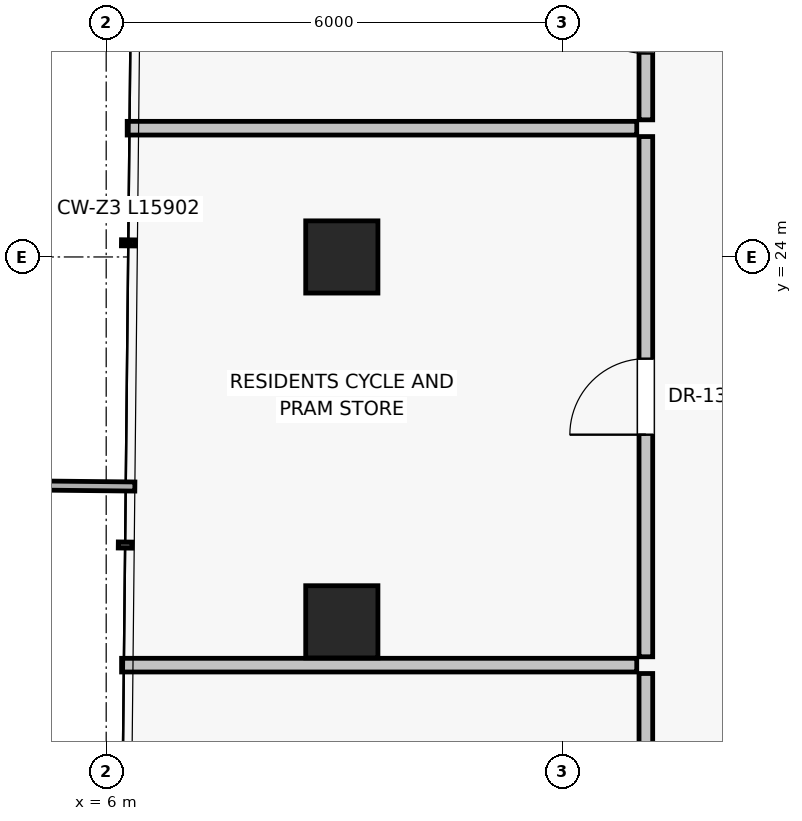
"""IFC4 building model, lengths in metres.
Left out: names, types, materials, properties, quantities, classifications, styles, units other than length and angle.
Written with IfcOpenShell. Run it as: python <this file> out.ifc"""

import sys

from ifc_helpers import new_model, si_unit, direction, frame, frame_2d, origin, origin_2d, place, context, subcontext, project, spatial, rectangle, extrude, source, transform, mapped, element, fill, save


model = new_model("IFC4")
c1 = context("Model", 3, precision=1e-05, world=origin(), true_north=direction((0.0, 1.0)))
c2 = subcontext(c1, "Body", "Model", "MODEL_VIEW")
j1 = project(units=[si_unit("LENGTHUNIT", "METRE"), si_unit("PLANEANGLEUNIT", "RADIAN")], contexts=[c1])
p1 = place(None, origin())
s1 = spatial("IfcSite", under=j1, at=p1, CompositionType="ELEMENT")
p2 = place(p1, origin())
s2 = spatial("IfcBuilding", under=s1, at=p2, CompositionType="ELEMENT")
p3 = place(p2, frame((0.0, 0.0, 208.1)))
s3 = spatial("IfcBuildingStorey", under=s2, at=p3, CompositionType="ELEMENT", Elevation=208.1)
for number, where, z_axis, x_axis in (
    (1, (9.1, 24.0, 0.0), (0.0, 0.0, 1.0), (1.0, 0.0, 0.0)),
    (2, (9.1, 19.2, 0.0), (0.0, 0.0, 1.0), (1.0, 0.0, 0.0)),
):
    element("IfcColumn", number, at=place(p3, frame(where, z_axis=z_axis, x_axis=x_axis)), inside=s3, PredefinedType="COLUMN", context=c2, shape_type="SweptSolid", body=[
        extrude(rectangle(XDim=0.95, YDim=0.95, at=origin_2d()), origin(), (0.0, 0.0, 1.0), 3.25),
    ])
p4 = place(p3, frame((13.1, 14.41, 0.0), z_axis=(0.0, 0.0, 1.0), x_axis=(0.0, 1.0, 0.0)))
e3 = element("IfcWall", 3, at=p4, inside=s3, PredefinedType="PARTITIONING", context=c2, shape_type="SweptSolid", body=[
    extrude(rectangle(XDim=4.11, YDim=0.18, at=frame_2d((2.055, 0.0))), origin(), (0.0, 0.0, 1.0), 2.617),
])
p5 = place(p4, frame((1.555, 0.0, 0.0)))
e4 = element("IfcOpeningElement", 4, at=p5, cuts=e3, PredefinedType="OPENING", context=c2, shape_type="SweptSolid", body=[
    extrude(rectangle(XDim=1.0, YDim=2.01, at=frame_2d((0.5, 1.005))), frame((0.0, 0.1, 0.0), z_axis=(0.0, -1.0, 0.0), x_axis=(1.0, 0.0, 0.0)), (0.0, 0.0, 1.0), 0.2),
])
p6 = place(p3, frame((13.1, 18.74, 0.0), z_axis=(0.0, 0.0, 1.0), x_axis=(0.0, 1.0, 0.0)))
e5 = element("IfcWall", 5, at=p6, inside=s3, PredefinedType="PARTITIONING", context=c2, shape_type="SweptSolid", body=[
    extrude(rectangle(XDim=6.844, YDim=0.18, at=frame_2d((3.422, 0.0))), origin(), (0.0, 0.0, 1.0), 2.617),
])
p7 = place(p6, frame((2.922, 0.0, 0.0)))
e6 = element("IfcOpeningElement", 6, at=p7, cuts=e5, PredefinedType="OPENING", context=c2, shape_type="SweptSolid", body=[
    extrude(rectangle(XDim=1.0, YDim=2.01, at=frame_2d((0.5, 1.005))), frame((0.0, 0.1, 0.0), z_axis=(0.0, -1.0, 0.0), x_axis=(1.0, 0.0, 0.0)), (0.0, 0.0, 1.0), 0.2),
])
p8 = place(p3, frame((12.98, 18.63, 0.0), z_axis=(0.0, 0.0, 1.0), x_axis=(-1.0, 0.0, 0.0)))
e7 = element("IfcWall", 7, at=p8, inside=s3, PredefinedType="PARTITIONING", context=c2, shape_type="SweptSolid", body=[
    extrude(rectangle(XDim=6.777, YDim=0.18, at=frame_2d((3.389, 0.0))), origin(), (0.0, 0.0, 1.0), 2.424),
])
p9 = place(p3, frame((12.98, 25.694, 0.0), z_axis=(0.0, 0.0, 1.0), x_axis=(-1.0, 0.0, 0.0)))
e8 = element("IfcWall", 8, at=p9, inside=s3, PredefinedType="PARTITIONING", context=c2, shape_type="SweptSolid", body=[
    extrude(rectangle(XDim=6.703, YDim=0.18, at=frame_2d((3.352, 0.0))), origin(), (0.0, 0.0, 1.0), 2.97),
])
p10 = place(p3, frame((13.1, 25.804, 0.0), z_axis=(0.0, 0.0, 1.0), x_axis=(0.0, 1.0, 0.0)))
e9 = element("IfcWall", 9, at=p10, inside=s3, PredefinedType="PARTITIONING", context=c2, shape_type="SweptSolid", body=[
    extrude(rectangle(XDim=2.746, YDim=0.18, at=frame_2d((1.373, 0.0))), origin(), (0.0, 0.0, 1.0), 2.617),
])
p11 = place(p10, frame((0.873, 0.0, 0.0)))
e10 = element("IfcOpeningElement", 10, at=p11, cuts=e9, PredefinedType="OPENING", context=c2, shape_type="SweptSolid", body=[
    extrude(rectangle(XDim=1.0, YDim=2.01, at=frame_2d((0.5, 1.005))), frame((0.0, 0.1, 0.0), z_axis=(0.0, -1.0, 0.0), x_axis=(1.0, 0.0, 0.0)), (0.0, 0.0, 1.0), 0.2),
])
m1 = source(origin(), c2, "Body", "SweptSolid", [
    extrude(rectangle(XDim=1.0, YDim=2.01, at=frame_2d((0.5, 1.005))), frame((0.0, 0.025, 0.0), z_axis=(0.0, -1.0, 0.0), x_axis=(1.0, 0.0, 0.0)), (0.0, 0.0, 1.0), 0.05),
])
p12 = place(p7, origin())
e11 = element("IfcDoor", 11, at=p12, inside=s3, OperationType="SINGLE_SWING_LEFT", PredefinedType="DOOR", context=c2, shape_type="MappedRepresentation", body=[
    mapped(m1, transform((0.0, 0.0, 0.0), scale=1.0)),
])
fill(e6, e11)
p13 = place(p11, origin())
e12 = element("IfcDoor", 12, at=p13, inside=s3, OperationType="SINGLE_SWING_RIGHT", PredefinedType="DOOR", context=c2, shape_type="MappedRepresentation", body=[
    mapped(m1, transform((0.0, 0.0, 0.0), scale=1.0)),
])
fill(e10, e12)
save(model, sys.argv[1])
